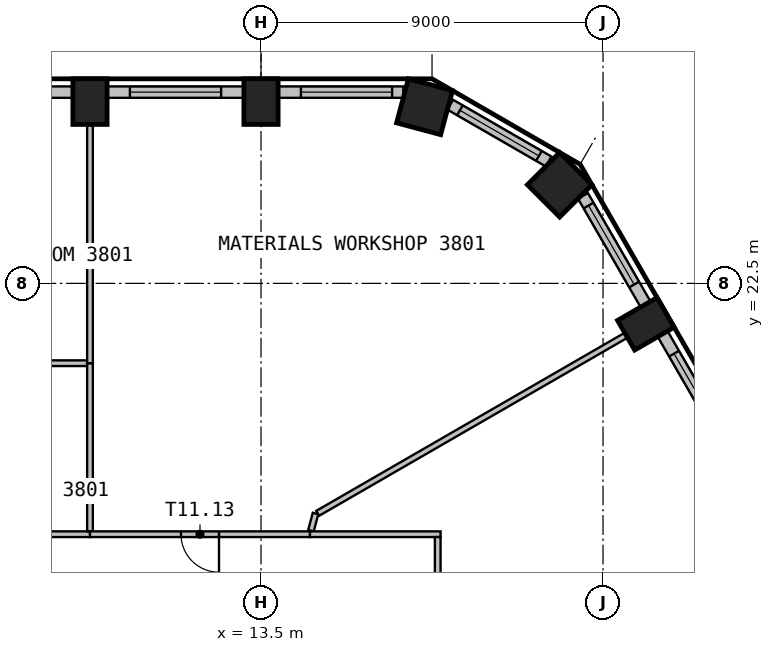
"""IFC4 building model, lengths in metres.
Left out: names, types, materials, properties, quantities, classifications, styles, units other than length and angle.
Written with IfcOpenShell. Run it as: python <this file> out.ifc"""

import sys

from ifc_helpers import new_model, si_unit, direction, frame, frame_2d, origin, origin_2d, place, context, subcontext, project, spatial, rectangle, extrude, element, fill, save


model = new_model("IFC4")
c1 = context("Model", 3, precision=1e-05, world=origin(), true_north=direction((0.0, 1.0)))
c2 = subcontext(c1, "Body", "Model", "MODEL_VIEW")
j1 = project(units=[si_unit("LENGTHUNIT", "METRE"), si_unit("PLANEANGLEUNIT", "RADIAN")], contexts=[c1])
p1 = place(None, origin())
s1 = spatial("IfcSite", under=j1, at=p1, CompositionType="ELEMENT")
p2 = place(p1, origin())
s2 = spatial("IfcBuilding", under=s1, at=p2, CompositionType="ELEMENT")
p3 = place(p2, frame((0.0, 0.0, 156.0)))
s3 = spatial("IfcBuildingStorey", under=s2, at=p3, CompositionType="ELEMENT", Elevation=156.0)
p4 = place(p3, frame((23.627, 21.436, 0.0), z_axis=(0.0, 0.0, 1.0), x_axis=(-0.5, 0.866025403784, 0.0)))
e1 = element("IfcColumn", 1, at=p4, inside=s3, PredefinedType="COLUMN", context=c2, shape_type="SweptSolid", body=[
    extrude(rectangle(XDim=0.9, YDim=1.2, at=origin_2d()), origin(), (0.0, 0.0, 1.0), 3.575),
])
for number, where, z_axis, x_axis in (
    (2, (21.359, 25.095, 0.0), (0.0, 0.0, 1.0), (-0.707, 0.707, 0.0)),
    (3, (17.803, 27.148, 0.0), (0.0, 0.0, 1.0), (-0.966, 0.259, 0.0)),
):
    element("IfcColumn", number, at=place(p3, frame(where, z_axis=z_axis, x_axis=x_axis)), inside=s3, PredefinedType="COLUMN", context=c2, shape_type="SweptSolid", body=[
        extrude(rectangle(XDim=1.2, YDim=1.2, at=origin_2d()), origin(), (0.0, 0.0, 1.0), 3.575),
    ])
for number, where, z_axis, x_axis in (
    (4, (13.5, 27.283, 0.0), (0.0, 0.0, 1.0), (-1.0, 0.0, 0.0)),
    (5, (9.0, 27.283, 0.0), (0.0, 0.0, 1.0), (-1.0, 0.0, 0.0)),
):
    element("IfcColumn", number, at=place(p3, frame(where, z_axis=z_axis, x_axis=x_axis)), inside=s3, PredefinedType="COLUMN", context=c2, shape_type="SweptSolid", body=[
        extrude(rectangle(XDim=0.9, YDim=1.2, at=origin_2d()), origin(), (0.0, 0.0, 1.0), 3.575),
    ])
p5 = place(p3, frame((25.869, 18.054, 0.0), z_axis=(0.0, 0.0, 1.0), x_axis=(-0.500027802648, 0.866009351323, 0.0)))
e6 = element("IfcWall", 6, at=p5, inside=s3, PredefinedType="SOLIDWALL", context=c2, shape_type="SweptSolid", body=[
    extrude(rectangle(XDim=3.599, YDim=0.3, at=frame_2d((1.799, 0.0))), origin(), (0.0, 0.0, 1.0), 3.575),
])
p6 = place(p5, frame((0.6, 0.0, 0.9)))
e7 = element("IfcOpeningElement", 7, at=p6, cuts=e6, PredefinedType="OPENING", context=c2, shape_type="SweptSolid", body=[
    extrude(rectangle(XDim=2.4, YDim=2.1, at=frame_2d((1.2, 1.05))), frame((0.0, 0.16, 0.0), z_axis=(0.0, -1.0, 0.0), x_axis=(1.0, 0.0, 0.0)), (0.0, 0.0, 1.0), 0.32),
])
p7 = place(p3, frame((23.619, 21.951, 0.0), z_axis=(0.0, 0.0, 1.0), x_axis=(-0.500036802197, 0.866004154983, 0.0)))
e8 = element("IfcWall", 8, at=p7, inside=s3, PredefinedType="SOLIDWALL", context=c2, shape_type="SweptSolid", body=[
    extrude(rectangle(XDim=3.294, YDim=0.3, at=frame_2d((1.647, 0.0))), origin(), (0.0, 0.0, 1.0), 3.575),
])
p8 = place(p7, frame((0.6, 0.0, 0.9)))
e9 = element("IfcOpeningElement", 9, at=p8, cuts=e8, PredefinedType="OPENING", context=c2, shape_type="SweptSolid", body=[
    extrude(rectangle(XDim=2.4, YDim=2.1, at=frame_2d((1.2, 1.05))), frame((0.0, 0.16, 0.0), z_axis=(0.0, -1.0, 0.0), x_axis=(1.0, 0.0, 0.0)), (0.0, 0.0, 1.0), 0.32),
])
p9 = place(p3, frame((21.068, 25.707, 0.0), z_axis=(0.0, 0.0, 1.0), x_axis=(-0.866012844897, 0.500021752, 0.0)))
e10 = element("IfcWall", 10, at=p9, inside=s3, PredefinedType="SOLIDWALL", context=c2, shape_type="SweptSolid", body=[
    extrude(rectangle(XDim=2.989, YDim=0.3, at=frame_2d((1.495, 0.0))), origin(), (0.0, 0.0, 1.0), 3.575),
])
p10 = place(p9, frame((0.295, 0.0, 0.9)))
e11 = element("IfcOpeningElement", 11, at=p10, cuts=e10, PredefinedType="OPENING", context=c2, shape_type="SweptSolid", body=[
    extrude(rectangle(XDim=2.4, YDim=2.1, at=frame_2d((1.2, 1.05))), frame((0.0, 0.16, 0.0), z_axis=(0.0, -1.0, 0.0), x_axis=(1.0, 0.0, 0.0)), (0.0, 0.0, 1.0), 0.32),
])
p11 = place(p3, frame((17.245, 27.533, 0.0), z_axis=(0.0, 0.0, 1.0), x_axis=(-1.0, 0.0, 0.0)))
e12 = element("IfcWall", 12, at=p11, inside=s3, PredefinedType="SOLIDWALL", context=c2, shape_type="SweptSolid", body=[
    extrude(rectangle(XDim=3.294, YDim=0.3, at=frame_2d((1.647, 0.0))), origin(), (0.0, 0.0, 1.0), 3.575),
])
p12 = place(p11, frame((0.295, 0.0, 0.9)))
e13 = element("IfcOpeningElement", 13, at=p12, cuts=e12, PredefinedType="OPENING", context=c2, shape_type="SweptSolid", body=[
    extrude(rectangle(XDim=2.4, YDim=2.1, at=frame_2d((1.2, 1.05))), frame((0.0, 0.16, 0.0), z_axis=(0.0, -1.0, 0.0), x_axis=(1.0, 0.0, 0.0)), (0.0, 0.0, 1.0), 0.32),
])
p13 = place(p3, frame((13.05, 27.533, 0.0), z_axis=(0.0, 0.0, 1.0), x_axis=(-1.0, 0.0, 0.0)))
e14 = element("IfcWall", 14, at=p13, inside=s3, PredefinedType="SOLIDWALL", context=c2, shape_type="SweptSolid", body=[
    extrude(rectangle(XDim=3.599, YDim=0.3, at=frame_2d((1.8, 0.0))), origin(), (0.0, 0.0, 1.0), 3.575),
])
p14 = place(p13, frame((0.6, 0.0, 0.9)))
e15 = element("IfcOpeningElement", 15, at=p14, cuts=e14, PredefinedType="OPENING", context=c2, shape_type="SweptSolid", body=[
    extrude(rectangle(XDim=2.4, YDim=2.1, at=frame_2d((1.2, 1.05))), frame((0.0, 0.16, 0.0), z_axis=(0.0, -1.0, 0.0), x_axis=(1.0, 0.0, 0.0)), (0.0, 0.0, 1.0), 0.32),
])
p15 = place(p3, frame((8.55, 27.533, 0.0), z_axis=(0.0, 0.0, 1.0), x_axis=(-1.0, 0.0, 0.0)))
e16 = element("IfcWall", 16, at=p15, inside=s3, PredefinedType="SOLIDWALL", context=c2, shape_type="SweptSolid", body=[
    extrude(rectangle(XDim=3.599, YDim=0.3, at=frame_2d((1.8, 0.0))), origin(), (0.0, 0.0, 1.0), 3.575),
])
p16 = place(p15, frame((0.6, 0.0, 0.9)))
e17 = element("IfcOpeningElement", 17, at=p16, cuts=e16, PredefinedType="OPENING", context=c2, shape_type="SweptSolid", body=[
    extrude(rectangle(XDim=2.4, YDim=2.1, at=frame_2d((1.2, 1.05))), frame((0.0, 0.16, 0.0), z_axis=(0.0, -1.0, 0.0), x_axis=(1.0, 0.0, 0.0)), (0.0, 0.0, 1.0), 0.32),
])
p17 = place(p3, frame((9.0, 15.9, 0.0), z_axis=(0.0, 0.0, 1.0), x_axis=(-1.0, 0.0, 0.0)))
e18 = element("IfcWall", 18, at=p17, inside=s3, PredefinedType="PARTITIONING", context=c2, shape_type="SweptSolid", body=[
    extrude(rectangle(XDim=4.425, YDim=0.15, at=frame_2d((2.212, 0.0))), origin(), (0.0, 0.0, 1.0), 3.575),
])
p18 = place(p3, frame((4.575, 20.4, 0.0), z_axis=(0.0, 0.0, 1.0), x_axis=(1.0, 0.0, 0.0)))
e19 = element("IfcWall", 19, at=p18, inside=s3, PredefinedType="PARTITIONING", context=c2, shape_type="SweptSolid", body=[
    extrude(rectangle(XDim=4.35, YDim=0.15, at=frame_2d((2.175, 0.0))), origin(), (0.0, 0.0, 1.0), 3.575),
])
p19 = place(p3, frame((9.0, 20.4, 0.0), z_axis=(0.0, 0.0, 1.0), x_axis=(0.0, -1.0, 0.0)))
e20 = element("IfcWall", 20, at=p19, inside=s3, PredefinedType="PARTITIONING", context=c2, shape_type="SweptSolid", body=[
    extrude(rectangle(XDim=4.425, YDim=0.15, at=frame_2d((2.212, 0.0))), origin(), (0.0, 0.0, 1.0), 3.575),
])
p20 = place(p3, frame((14.789, 15.9, 0.0), z_axis=(0.0, 0.0, 1.0), x_axis=(-1.0, 0.0, 0.0)))
e21 = element("IfcWall", 21, at=p20, inside=s3, PredefinedType="PARTITIONING", context=c2, shape_type="SweptSolid", body=[
    extrude(rectangle(XDim=5.789, YDim=0.15, at=frame_2d((2.895, 0.0))), origin(), (0.0, 0.0, 1.0), 3.575),
])
p21 = place(p20, frame((2.395, 0.0, 0.0)))
e22 = element("IfcOpeningElement", 22, at=p21, cuts=e21, PredefinedType="OPENING", context=c2, shape_type="SweptSolid", body=[
    extrude(rectangle(XDim=1.0, YDim=2.1, at=frame_2d((0.5, 1.05))), frame((0.0, 0.085, 0.0), z_axis=(0.0, -1.0, 0.0), x_axis=(1.0, 0.0, 0.0)), (0.0, 0.0, 1.0), 0.17),
])
p22 = place(p3, frame((9.0, 26.663, 0.0), z_axis=(0.0, 0.0, 1.0), x_axis=(0.0, -1.0, 0.0)))
e23 = element("IfcWall", 23, at=p22, inside=s3, PredefinedType="PARTITIONING", context=c2, shape_type="SweptSolid", body=[
    extrude(rectangle(XDim=6.263, YDim=0.15, at=frame_2d((3.131, 0.0))), origin(), (0.0, 0.0, 1.0), 3.575),
])
p23 = place(p3, frame((14.935, 16.446, 0.0), z_axis=(0.0, 0.0, 1.0), x_axis=(-0.258147545917, -0.966105503833, 0.0)))
e24 = element("IfcWall", 24, at=p23, inside=s3, PredefinedType="PARTITIONING", context=c2, shape_type="SweptSolid", body=[
    extrude(rectangle(XDim=0.47, YDim=0.15, at=frame_2d((0.235, 0.0))), origin(), (0.0, 0.0, 1.0), 3.575),
])
p24 = place(p3, frame((18.225, 15.9, 0.0), z_axis=(0.0, 0.0, 1.0), x_axis=(-1.0, 0.0, 0.0)))
e25 = element("IfcWall", 25, at=p24, inside=s3, PredefinedType="PARTITIONING", context=c2, shape_type="SweptSolid", body=[
    extrude(rectangle(XDim=3.436, YDim=0.15, at=frame_2d((1.718, 0.0))), origin(), (0.0, 0.0, 1.0), 3.575),
])
p25 = place(p3, frame((23.09, 21.126, 0.0), z_axis=(0.0, 0.0, 1.0), x_axis=(-0.86600952399, -0.500027503603, 0.0)))
e26 = element("IfcWall", 26, at=p25, inside=s3, PredefinedType="PARTITIONING", context=c2, shape_type="SweptSolid", body=[
    extrude(rectangle(XDim=9.353, YDim=0.15, at=frame_2d((4.676, 0.0))), origin(), (0.0, 0.0, 1.0), 3.575),
])
p26 = place(p3, frame((18.15, 2.175, 0.0), z_axis=(0.0, 0.0, 1.0), x_axis=(0.0, 1.0, 0.0)))
e27 = element("IfcWall", 27, at=p26, inside=s3, PredefinedType="PARTITIONING", context=c2, shape_type="SweptSolid", body=[
    extrude(rectangle(XDim=13.65, YDim=0.15, at=frame_2d((6.825, 0.0))), origin(), (0.0, 0.0, 1.0), 3.575),
])
p27 = place(p26, frame((6.325, 0.0, 0.0)))
e28 = element("IfcOpeningElement", 28, at=p27, cuts=e27, PredefinedType="OPENING", context=c2, shape_type="SweptSolid", body=[
    extrude(rectangle(XDim=1.0, YDim=2.1, at=frame_2d((0.5, 1.05))), frame((0.0, 0.085, 0.0), z_axis=(0.0, -1.0, 0.0), x_axis=(1.0, 0.0, 0.0)), (0.0, 0.0, 1.0), 0.17),
])
p28 = place(p6, origin())
e29 = element("IfcWindow", 29, at=p28, inside=s3, PartitioningType="SINGLE_PANEL", PredefinedType="WINDOW", context=c2, shape_type="SweptSolid", body=[
    extrude(rectangle(XDim=2.4, YDim=2.1, at=frame_2d((1.2, 1.05))), frame((0.0, 0.03, 0.0), z_axis=(0.0, -1.0, 0.0), x_axis=(1.0, 0.0, 0.0)), (0.0, 0.0, 1.0), 0.06),
])
fill(e7, e29)
p29 = place(p8, origin())
e30 = element("IfcWindow", 30, at=p29, inside=s3, PartitioningType="SINGLE_PANEL", PredefinedType="WINDOW", context=c2, shape_type="SweptSolid", body=[
    extrude(rectangle(XDim=2.4, YDim=2.1, at=frame_2d((1.2, 1.05))), frame((0.0, 0.03, 0.0), z_axis=(0.0, -1.0, 0.0), x_axis=(1.0, 0.0, 0.0)), (0.0, 0.0, 1.0), 0.06),
])
fill(e9, e30)
p30 = place(p10, origin())
e31 = element("IfcWindow", 31, at=p30, inside=s3, PartitioningType="SINGLE_PANEL", PredefinedType="WINDOW", context=c2, shape_type="SweptSolid", body=[
    extrude(rectangle(XDim=2.4, YDim=2.1, at=frame_2d((1.2, 1.05))), frame((0.0, 0.03, 0.0), z_axis=(0.0, -1.0, 0.0), x_axis=(1.0, 0.0, 0.0)), (0.0, 0.0, 1.0), 0.06),
])
fill(e11, e31)
p31 = place(p12, origin())
e32 = element("IfcWindow", 32, at=p31, inside=s3, PartitioningType="SINGLE_PANEL", PredefinedType="WINDOW", context=c2, shape_type="SweptSolid", body=[
    extrude(rectangle(XDim=2.4, YDim=2.1, at=frame_2d((1.2, 1.05))), frame((0.0, 0.03, 0.0), z_axis=(0.0, -1.0, 0.0), x_axis=(1.0, 0.0, 0.0)), (0.0, 0.0, 1.0), 0.06),
])
fill(e13, e32)
p32 = place(p14, origin())
e33 = element("IfcWindow", 33, at=p32, inside=s3, PartitioningType="SINGLE_PANEL", PredefinedType="WINDOW", context=c2, shape_type="SweptSolid", body=[
    extrude(rectangle(XDim=2.4, YDim=2.1, at=frame_2d((1.2, 1.05))), frame((0.0, 0.03, 0.0), z_axis=(0.0, -1.0, 0.0), x_axis=(1.0, 0.0, 0.0)), (0.0, 0.0, 1.0), 0.06),
])
fill(e15, e33)
p33 = place(p21, origin())
e34 = element("IfcDoor", 34, at=p33, inside=s3, OperationType="SINGLE_SWING_RIGHT", PredefinedType="DOOR", context=c2, shape_type="SweptSolid", body=[
    extrude(rectangle(XDim=1.0, YDim=2.1, at=frame_2d((0.5, 1.05))), frame((0.0, 0.025, 0.0), z_axis=(0.0, -1.0, 0.0), x_axis=(1.0, 0.0, 0.0)), (0.0, 0.0, 1.0), 0.05),
])
fill(e22, e34)
save(model, sys.argv[1])
